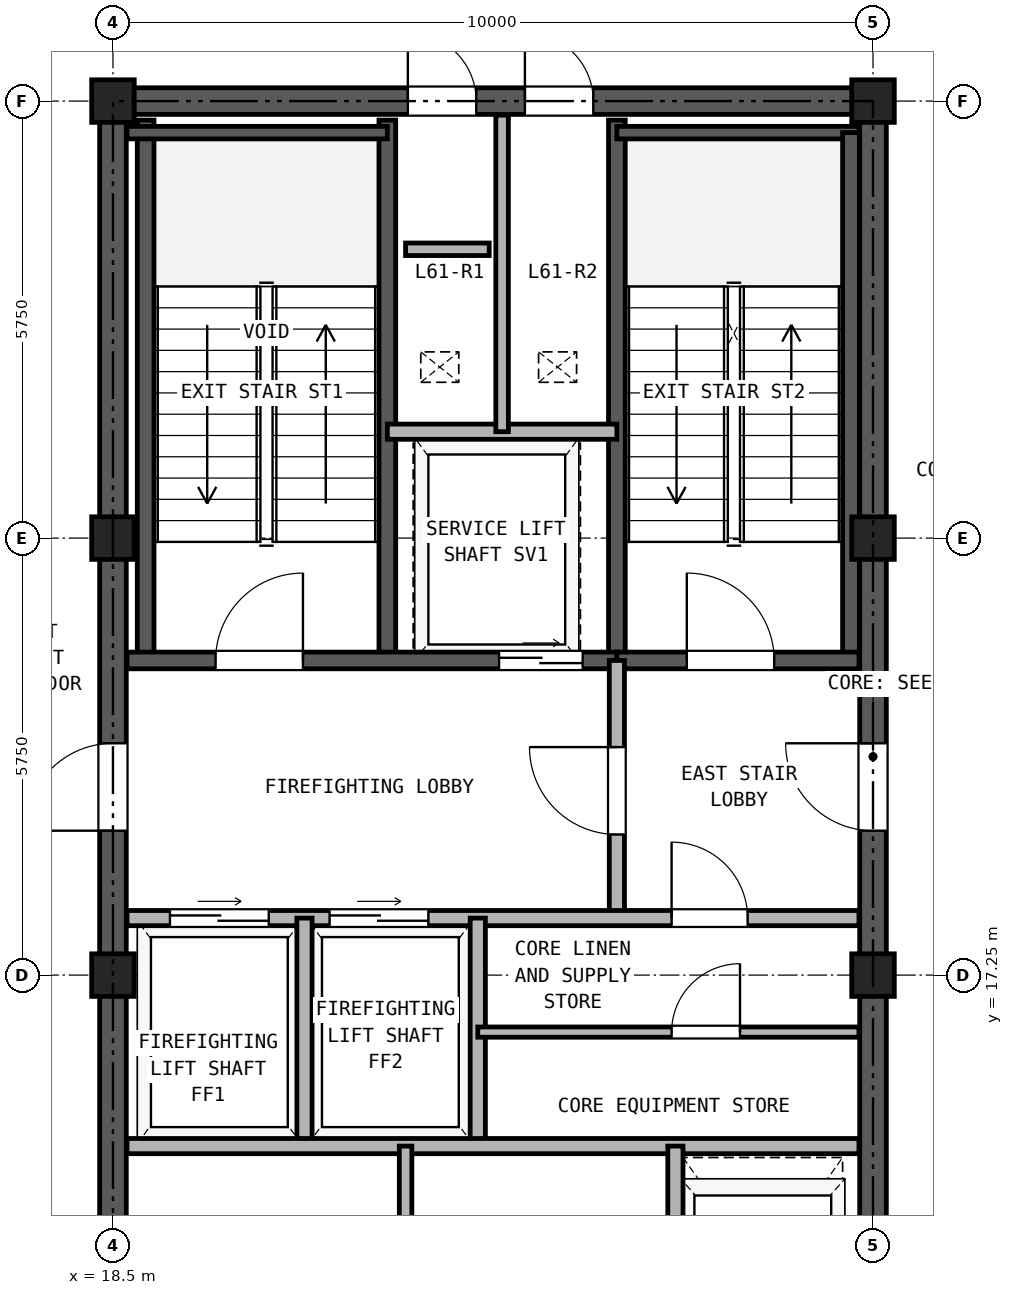
"""IFC4 building model, lengths in metres.
Left out: names, types, materials, properties, quantities, classifications, styles, units other than length and angle.
Written with IfcOpenShell. Run it as: python <this file> out.ifc"""

import sys

from ifc_helpers import new_model, si_unit, direction, frame, frame_2d, origin, origin_2d, place, context, subcontext, project, spatial, rectangle, hollow_rectangle, extrude, source, transform, mapped, element, fill, save


model = new_model("IFC4")
c1 = context("Model", 3, precision=1e-05, world=origin(), true_north=direction((0.0, 1.0)))
c2 = subcontext(c1, "Body", "Model", "MODEL_VIEW")
j1 = project(units=[si_unit("LENGTHUNIT", "METRE"), si_unit("PLANEANGLEUNIT", "RADIAN")], contexts=[c1])
p1 = place(None, origin())
s1 = spatial("IfcSite", under=j1, at=p1, CompositionType="ELEMENT")
p2 = place(p1, origin())
s2 = spatial("IfcBuilding", under=s1, at=p2, CompositionType="ELEMENT")
p3 = place(p2, frame((0.0, 0.0, 215.6)))
s3 = spatial("IfcBuildingStorey", under=s2, at=p3, CompositionType="ELEMENT", Elevation=215.6)
m1 = source(origin(), c2, "Body", "SweptSolid", [
    extrude(hollow_rectangle(XDim=0.56, YDim=0.56, WallThickness=0.03, at=origin_2d()), origin(), (0.0, 0.0, 1.0), 4.28),
])
for number, where, z_axis, x_axis in (
    (1, (18.5, 17.25, 0.0), (0.0, 0.0, 1.0), (1.0, 0.0, 0.0)),
    (2, (18.5, 23.0, 0.0), (0.0, 0.0, 1.0), (1.0, 0.0, 0.0)),
    (3, (18.5, 28.75, 0.0), (0.0, 0.0, 1.0), (1.0, 0.0, 0.0)),
    (4, (28.5, 17.25, 0.0), (0.0, 0.0, 1.0), (1.0, 0.0, 0.0)),
    (5, (28.5, 23.0, 0.0), (0.0, 0.0, 1.0), (1.0, 0.0, 0.0)),
    (6, (28.5, 28.75, 0.0), (0.0, 0.0, 1.0), (1.0, 0.0, 0.0)),
):
    element("IfcColumn", number, at=place(p3, frame(where, z_axis=z_axis, x_axis=x_axis)), inside=s3, PredefinedType="COLUMN", context=c2, shape_type="MappedRepresentation", body=[
        mapped(m1, transform((0.0, 0.0, 0.0), x_axis=(1.0, 0.0, 0.0), y_axis=(0.0, 1.0, 0.0), z_axis=(0.0, 0.0, 1.0), scale=1.0)),
    ])
p4 = place(p3, frame((18.325, 28.75, 0.0), z_axis=(0.0, 0.0, 1.0), x_axis=(1.0, 0.0, 0.0)))
e7 = element("IfcWall", 7, at=p4, inside=s3, PredefinedType="SHEAR", context=c2, shape_type="SweptSolid", body=[
    extrude(rectangle(XDim=10.35, YDim=0.35, at=frame_2d((5.175, 0.0))), origin(), (0.0, 0.0, 1.0), 4.28),
])
p5 = place(p4, frame((4.055, 0.0, 0.0)))
e8 = element("IfcOpeningElement", 8, at=p5, cuts=e7, PredefinedType="OPENING", context=c2, shape_type="SweptSolid", body=[
    extrude(rectangle(XDim=0.9, YDim=2.05, at=frame_2d((0.45, 1.025))), frame((0.0, 0.185, 0.0), z_axis=(0.0, -1.0, 0.0), x_axis=(1.0, 0.0, 0.0)), (0.0, 0.0, 1.0), 0.37),
])
p6 = place(p4, frame((5.595, 0.0, 0.0)))
e9 = element("IfcOpeningElement", 9, at=p6, cuts=e7, PredefinedType="OPENING", context=c2, shape_type="SweptSolid", body=[
    extrude(rectangle(XDim=0.9, YDim=2.05, at=frame_2d((0.45, 1.025))), frame((0.0, 0.185, 0.0), z_axis=(0.0, -1.0, 0.0), x_axis=(1.0, 0.0, 0.0)), (0.0, 0.0, 1.0), 0.37),
])
p7 = place(p3, frame((18.5, 11.675, 0.0), z_axis=(0.0, 0.0, 1.0), x_axis=(0.0, 1.0, 0.0)))
e10 = element("IfcWall", 10, at=p7, inside=s3, PredefinedType="SHEAR", context=c2, shape_type="SweptSolid", body=[
    extrude(rectangle(XDim=16.9, YDim=0.35, at=frame_2d((8.45, 0.0))), origin(), (0.0, 0.0, 1.0), 4.28),
])
p8 = place(p7, frame((7.475, 0.0, 0.0)))
e11 = element("IfcOpeningElement", 11, at=p8, cuts=e10, PredefinedType="OPENING", context=c2, shape_type="SweptSolid", body=[
    extrude(rectangle(XDim=1.15, YDim=2.2, at=frame_2d((0.575, 1.1))), frame((0.0, 0.185, 0.0), z_axis=(0.0, -1.0, 0.0), x_axis=(1.0, 0.0, 0.0)), (0.0, 0.0, 1.0), 0.37),
])
p9 = place(p3, frame((28.5, 11.675, 0.0), z_axis=(0.0, 0.0, 1.0), x_axis=(0.0, 1.0, 0.0)))
e12 = element("IfcWall", 12, at=p9, inside=s3, PredefinedType="SHEAR", context=c2, shape_type="SweptSolid", body=[
    extrude(rectangle(XDim=16.9, YDim=0.35, at=frame_2d((8.45, 0.0))), origin(), (0.0, 0.0, 1.0), 4.28),
])
p10 = place(p9, frame((7.475, 0.0, 0.0)))
e13 = element("IfcOpeningElement", 13, at=p10, cuts=e12, PredefinedType="OPENING", context=c2, shape_type="SweptSolid", body=[
    extrude(rectangle(XDim=1.15, YDim=2.2, at=frame_2d((0.575, 1.1))), frame((0.0, 0.185, 0.0), z_axis=(0.0, -1.0, 0.0), x_axis=(1.0, 0.0, 0.0)), (0.0, 0.0, 1.0), 0.37),
])
for number, where, z_axis, x_axis in (
    (14, (18.93, 21.39, 0.0), (0.0, 0.0, 1.0), (0.0, 1.0, 0.0)),
    (15, (22.11, 21.39, 0.0), (0.0, 0.0, 1.0), (0.0, 1.0, 0.0)),
    (16, (25.13, 21.39, 0.0), (0.0, 0.0, 1.0), (0.0, 1.0, 0.0)),
):
    element("IfcWall", number, at=place(p3, frame(where, z_axis=z_axis, x_axis=x_axis)), inside=s3, PredefinedType="SOLIDWALL", context=c2, shape_type="SweptSolid", body=[
        extrude(rectangle(XDim=7.11, YDim=0.22, at=frame_2d((3.555, 0.0))), origin(), (0.0, 0.0, 1.0), 4.28),
    ])
p11 = place(p3, frame((18.685, 28.335, 0.0), z_axis=(0.0, 0.0, 1.0), x_axis=(1.0, 0.0, 0.0)))
e17 = element("IfcWall", 17, at=p11, inside=s3, PredefinedType="PARTITIONING", context=c2, shape_type="SweptSolid", body=[
    extrude(rectangle(XDim=3.425, YDim=0.165, at=frame_2d((1.712, 0.0))), origin(), (0.0, 0.0, 1.0), 4.28),
])
p12 = place(p3, frame((25.13, 28.335, 0.0), z_axis=(0.0, 0.0, 1.0), x_axis=(1.0, 0.0, 0.0)))
e18 = element("IfcWall", 18, at=p12, inside=s3, PredefinedType="PARTITIONING", context=c2, shape_type="SweptSolid", body=[
    extrude(rectangle(XDim=3.185, YDim=0.165, at=frame_2d((1.593, 0.0))), origin(), (0.0, 0.0, 1.0), 4.28),
])
p13 = place(p3, frame((28.21, 21.39, 0.0), z_axis=(0.0, 0.0, 1.0), x_axis=(0.0, 1.0, 0.0)))
e19 = element("IfcWall", 19, at=p13, inside=s3, PredefinedType="SOLIDWALL", context=c2, shape_type="SweptSolid", body=[
    extrude(rectangle(XDim=6.945, YDim=0.22, at=frame_2d((3.473, 0.0))), origin(), (0.0, 0.0, 1.0), 4.28),
])
p14 = place(p3, frame((18.685, 21.39, 0.0), z_axis=(0.0, 0.0, 1.0), x_axis=(1.0, 0.0, 0.0)))
e20 = element("IfcWall", 20, at=p14, inside=s3, PredefinedType="SOLIDWALL", context=c2, shape_type="SweptSolid", body=[
    extrude(rectangle(XDim=6.445, YDim=0.22, at=frame_2d((3.222, 0.0))), origin(), (0.0, 0.0, 1.0), 4.28),
])
p15 = place(p14, frame((1.165, 0.0, 0.0)))
e21 = element("IfcOpeningElement", 21, at=p15, cuts=e20, PredefinedType="OPENING", context=c2, shape_type="SweptSolid", body=[
    extrude(rectangle(XDim=1.15, YDim=2.2, at=frame_2d((0.575, 1.1))), frame((0.0, 0.12, 0.0), z_axis=(0.0, -1.0, 0.0), x_axis=(1.0, 0.0, 0.0)), (0.0, 0.0, 1.0), 0.24),
])
p16 = place(p14, frame((4.895, 0.0, 0.0)))
e22 = element("IfcOpeningElement", 22, at=p16, cuts=e20, PredefinedType="OPENING", context=c2, shape_type="SweptSolid", body=[
    extrude(rectangle(XDim=1.1, YDim=2.25, at=frame_2d((0.55, 1.125))), frame((0.0, 0.12, 0.0), z_axis=(0.0, -1.0, 0.0), x_axis=(1.0, 0.0, 0.0)), (0.0, 0.0, 1.0), 0.24),
])
p17 = place(p3, frame((25.13, 21.39, 0.0), z_axis=(0.0, 0.0, 1.0), x_axis=(1.0, 0.0, 0.0)))
e23 = element("IfcWall", 23, at=p17, inside=s3, PredefinedType="SOLIDWALL", context=c2, shape_type="SweptSolid", body=[
    extrude(rectangle(XDim=3.185, YDim=0.22, at=frame_2d((1.593, 0.0))), origin(), (0.0, 0.0, 1.0), 4.28),
])
p18 = place(p17, frame((0.92, 0.0, 0.0)))
e24 = element("IfcOpeningElement", 24, at=p18, cuts=e23, PredefinedType="OPENING", context=c2, shape_type="SweptSolid", body=[
    extrude(rectangle(XDim=1.15, YDim=2.2, at=frame_2d((0.575, 1.1))), frame((0.0, 0.12, 0.0), z_axis=(0.0, -1.0, 0.0), x_axis=(1.0, 0.0, 0.0)), (0.0, 0.0, 1.0), 0.24),
])
p19 = place(p3, frame((22.11, 24.4, 0.0), z_axis=(0.0, 0.0, 1.0), x_axis=(1.0, 0.0, 0.0)))
e25 = element("IfcWall", 25, at=p19, inside=s3, PredefinedType="PARTITIONING", context=c2, shape_type="SweptSolid", body=[
    extrude(rectangle(XDim=3.02, YDim=0.2, at=frame_2d((1.51, 0.0))), origin(), (0.0, 0.0, 1.0), 4.28),
])
p20 = place(p3, frame((23.62, 24.4, 0.0), z_axis=(0.0, 0.0, 1.0), x_axis=(0.0, 1.0, 0.0)))
e26 = element("IfcWall", 26, at=p20, inside=s3, PredefinedType="PARTITIONING", context=c2, shape_type="SweptSolid", body=[
    extrude(rectangle(XDim=4.165, YDim=0.165, at=frame_2d((2.083, 0.0))), origin(), (0.0, 0.0, 1.0), 4.28),
])
p21 = place(p3, frame((25.13, 18.0, 0.0), z_axis=(0.0, 0.0, 1.0), x_axis=(0.0, 1.0, 0.0)))
e27 = element("IfcWall", 27, at=p21, inside=s3, PredefinedType="PARTITIONING", context=c2, shape_type="SweptSolid", body=[
    extrude(rectangle(XDim=3.39, YDim=0.2, at=frame_2d((1.695, 0.0))), origin(), (0.0, 0.0, 1.0), 4.28),
])
p22 = place(p21, frame((1.1, 0.0, 0.0)))
e28 = element("IfcOpeningElement", 28, at=p22, cuts=e27, PredefinedType="OPENING", context=c2, shape_type="SweptSolid", body=[
    extrude(rectangle(XDim=1.15, YDim=2.2, at=frame_2d((0.575, 1.1))), frame((0.0, 0.11, 0.0), z_axis=(0.0, -1.0, 0.0), x_axis=(1.0, 0.0, 0.0)), (0.0, 0.0, 1.0), 0.22),
])
p23 = place(p3, frame((18.685, 18.0, 0.0), z_axis=(0.0, 0.0, 1.0), x_axis=(1.0, 0.0, 0.0)))
e29 = element("IfcWall", 29, at=p23, inside=s3, PredefinedType="PARTITIONING", context=c2, shape_type="SweptSolid", body=[
    extrude(rectangle(XDim=9.63, YDim=0.2, at=frame_2d((4.815, 0.0))), origin(), (0.0, 0.0, 1.0), 4.28),
])
p24 = place(p23, frame((0.565, 0.0, 0.0)))
e30 = element("IfcOpeningElement", 30, at=p24, cuts=e29, PredefinedType="OPENING", context=c2, shape_type="SweptSolid", body=[
    extrude(rectangle(XDim=1.3, YDim=2.3, at=frame_2d((0.65, 1.15))), frame((0.0, 0.11, 0.0), z_axis=(0.0, -1.0, 0.0), x_axis=(1.0, 0.0, 0.0)), (0.0, 0.0, 1.0), 0.22),
])
p25 = place(p23, frame((2.665, 0.0, 0.0)))
e31 = element("IfcOpeningElement", 31, at=p25, cuts=e29, PredefinedType="OPENING", context=c2, shape_type="SweptSolid", body=[
    extrude(rectangle(XDim=1.3, YDim=2.3, at=frame_2d((0.65, 1.15))), frame((0.0, 0.11, 0.0), z_axis=(0.0, -1.0, 0.0), x_axis=(1.0, 0.0, 0.0)), (0.0, 0.0, 1.0), 0.22),
])
p26 = place(p23, frame((7.165, 0.0, 0.0)))
e32 = element("IfcOpeningElement", 32, at=p26, cuts=e29, PredefinedType="OPENING", context=c2, shape_type="SweptSolid", body=[
    extrude(rectangle(XDim=1.0, YDim=2.15, at=frame_2d((0.5, 1.075))), frame((0.0, 0.11, 0.0), z_axis=(0.0, -1.0, 0.0), x_axis=(1.0, 0.0, 0.0)), (0.0, 0.0, 1.0), 0.22),
])
for number, where, z_axis, x_axis in (
    (33, (21.02, 15.0, 0.0), (0.0, 0.0, 1.0), (0.0, 1.0, 0.0)),
    (34, (23.3, 15.0, 0.0), (0.0, 0.0, 1.0), (0.0, 1.0, 0.0)),
):
    element("IfcWall", number, at=place(p3, frame(where, z_axis=z_axis, x_axis=x_axis)), inside=s3, PredefinedType="PARTITIONING", context=c2, shape_type="SweptSolid", body=[
        extrude(rectangle(XDim=3.0, YDim=0.2, at=frame_2d((1.5, 0.0))), origin(), (0.0, 0.0, 1.0), 4.28),
    ])
p27 = place(p3, frame((18.685, 15.0, 0.0), z_axis=(0.0, 0.0, 1.0), x_axis=(1.0, 0.0, 0.0)))
e35 = element("IfcWall", 35, at=p27, inside=s3, PredefinedType="PARTITIONING", context=c2, shape_type="SweptSolid", body=[
    extrude(rectangle(XDim=9.63, YDim=0.2, at=frame_2d((4.815, 0.0))), origin(), (0.0, 0.0, 1.0), 4.28),
])
p28 = place(p3, frame((23.3, 16.5, 0.0), z_axis=(0.0, 0.0, 1.0), x_axis=(1.0, 0.0, 0.0)))
e36 = element("IfcWall", 36, at=p28, inside=s3, PredefinedType="PARTITIONING", context=c2, shape_type="SweptSolid", body=[
    extrude(rectangle(XDim=5.015, YDim=0.135, at=frame_2d((2.507, 0.0))), origin(), (0.0, 0.0, 1.0), 4.28),
])
p29 = place(p28, frame((2.55, 0.0, 0.0)))
e37 = element("IfcOpeningElement", 37, at=p29, cuts=e36, PredefinedType="OPENING", context=c2, shape_type="SweptSolid", body=[
    extrude(rectangle(XDim=0.9, YDim=2.05, at=frame_2d((0.45, 1.025))), frame((0.0, 0.077, 0.0), z_axis=(0.0, -1.0, 0.0), x_axis=(1.0, 0.0, 0.0)), (0.0, 0.0, 1.0), 0.155),
])
p30 = place(p3, frame((22.35, 11.685, 0.0), z_axis=(0.0, 0.0, 1.0), x_axis=(0.0, 1.0, 0.0)))
e38 = element("IfcWall", 38, at=p30, inside=s3, PredefinedType="PARTITIONING", context=c2, shape_type="SweptSolid", body=[
    extrude(rectangle(XDim=3.315, YDim=0.165, at=frame_2d((1.657, 0.0))), origin(), (0.0, 0.0, 1.0), 4.28),
])
p31 = place(p3, frame((25.9, 11.685, 0.0), z_axis=(0.0, 0.0, 1.0), x_axis=(0.0, 1.0, 0.0)))
e39 = element("IfcWall", 39, at=p31, inside=s3, PredefinedType="PARTITIONING", context=c2, shape_type="SweptSolid", body=[
    extrude(rectangle(XDim=3.315, YDim=0.2, at=frame_2d((1.657, 0.0))), origin(), (0.0, 0.0, 1.0), 4.28),
])
p32 = place(p3, frame((22.35, 26.8, 0.0), z_axis=(0.0, 0.0, 1.0), x_axis=(1.0, 0.0, 0.0)))
e40 = element("IfcWall", 40, at=p32, inside=s3, PredefinedType="PARTITIONING", context=c2, shape_type="SweptSolid", body=[
    extrude(rectangle(XDim=1.1, YDim=0.165, at=frame_2d((0.55, 0.0))), origin(), (0.0, 0.0, 1.0), 4.28),
])
p33 = place(p15, frame((1.15, 0.0, 0.0), z_axis=(0.0, 0.0, 1.0), x_axis=(-1.0, 0.0, 0.0)))
e41 = element("IfcDoor", 41, at=p33, inside=s3, OperationType="SINGLE_SWING_RIGHT", PredefinedType="DOOR", context=c2, shape_type="SweptSolid", body=[
    extrude(rectangle(XDim=1.15, YDim=2.2, at=frame_2d((0.575, 1.1))), frame((0.0, 0.025, 0.0), z_axis=(0.0, -1.0, 0.0), x_axis=(1.0, 0.0, 0.0)), (0.0, 0.0, 1.0), 0.05),
])
fill(e21, e41)
p34 = place(p18, frame((1.15, 0.0, 0.0), z_axis=(0.0, 0.0, 1.0), x_axis=(-1.0, 0.0, 0.0)))
e42 = element("IfcDoor", 42, at=p34, inside=s3, OperationType="SINGLE_SWING_LEFT", PredefinedType="DOOR", context=c2, shape_type="SweptSolid", body=[
    extrude(rectangle(XDim=1.15, YDim=2.2, at=frame_2d((0.575, 1.1))), frame((0.0, 0.025, 0.0), z_axis=(0.0, -1.0, 0.0), x_axis=(1.0, 0.0, 0.0)), (0.0, 0.0, 1.0), 0.05),
])
fill(e24, e42)
p35 = place(p16, frame((1.1, 0.0, 0.0), z_axis=(0.0, 0.0, 1.0), x_axis=(-1.0, 0.0, 0.0)))
e43 = element("IfcDoor", 43, at=p35, inside=s3, OperationType="DOUBLE_DOOR_SLIDING", PredefinedType="DOOR", context=c2, shape_type="SweptSolid", body=[
    extrude(rectangle(XDim=1.1, YDim=2.25, at=frame_2d((0.55, 1.125))), frame((0.0, 0.025, 0.0), z_axis=(0.0, -1.0, 0.0), x_axis=(1.0, 0.0, 0.0)), (0.0, 0.0, 1.0), 0.05),
])
fill(e22, e43)
p36 = place(p22, origin())
e44 = element("IfcDoor", 44, at=p36, inside=s3, OperationType="SINGLE_SWING_RIGHT", PredefinedType="DOOR", context=c2, shape_type="SweptSolid", body=[
    extrude(rectangle(XDim=1.15, YDim=2.2, at=frame_2d((0.575, 1.1))), frame((0.0, 0.025, 0.0), z_axis=(0.0, -1.0, 0.0), x_axis=(1.0, 0.0, 0.0)), (0.0, 0.0, 1.0), 0.05),
])
fill(e28, e44)
p37 = place(p24, origin())
e45 = element("IfcDoor", 45, at=p37, inside=s3, OperationType="DOUBLE_DOOR_SLIDING", PredefinedType="DOOR", context=c2, shape_type="SweptSolid", body=[
    extrude(rectangle(XDim=1.3, YDim=2.3, at=frame_2d((0.65, 1.15))), frame((0.0, 0.025, 0.0), z_axis=(0.0, -1.0, 0.0), x_axis=(1.0, 0.0, 0.0)), (0.0, 0.0, 1.0), 0.05),
])
fill(e30, e45)
p38 = place(p25, origin())
e46 = element("IfcDoor", 46, at=p38, inside=s3, OperationType="DOUBLE_DOOR_SLIDING", PredefinedType="DOOR", context=c2, shape_type="SweptSolid", body=[
    extrude(rectangle(XDim=1.3, YDim=2.3, at=frame_2d((0.65, 1.15))), frame((0.0, 0.025, 0.0), z_axis=(0.0, -1.0, 0.0), x_axis=(1.0, 0.0, 0.0)), (0.0, 0.0, 1.0), 0.05),
])
fill(e31, e46)
p39 = place(p26, frame((1.0, 0.0, 0.0), z_axis=(0.0, 0.0, 1.0), x_axis=(-1.0, 0.0, 0.0)))
e47 = element("IfcDoor", 47, at=p39, inside=s3, OperationType="SINGLE_SWING_LEFT", PredefinedType="DOOR", context=c2, shape_type="SweptSolid", body=[
    extrude(rectangle(XDim=1.0, YDim=2.15, at=frame_2d((0.5, 1.075))), frame((0.0, 0.025, 0.0), z_axis=(0.0, -1.0, 0.0), x_axis=(1.0, 0.0, 0.0)), (0.0, 0.0, 1.0), 0.05),
])
fill(e32, e47)
p40 = place(p29, frame((0.9, 0.0, 0.0), z_axis=(0.0, 0.0, 1.0), x_axis=(-1.0, 0.0, 0.0)))
e48 = element("IfcDoor", 48, at=p40, inside=s3, OperationType="SINGLE_SWING_RIGHT", PredefinedType="DOOR", context=c2, shape_type="SweptSolid", body=[
    extrude(rectangle(XDim=0.9, YDim=2.05, at=frame_2d((0.45, 1.025))), frame((0.0, 0.025, 0.0), z_axis=(0.0, -1.0, 0.0), x_axis=(1.0, 0.0, 0.0)), (0.0, 0.0, 1.0), 0.05),
])
fill(e37, e48)
p41 = place(p8, frame((1.15, 0.0, 0.0), z_axis=(0.0, 0.0, 1.0), x_axis=(-1.0, 0.0, 0.0)))
e49 = element("IfcDoor", 49, at=p41, inside=s3, OperationType="SINGLE_SWING_LEFT", PredefinedType="DOOR", context=c2, shape_type="SweptSolid", body=[
    extrude(rectangle(XDim=1.15, YDim=2.2, at=frame_2d((0.575, 1.1))), frame((0.0, 0.025, 0.0), z_axis=(0.0, -1.0, 0.0), x_axis=(1.0, 0.0, 0.0)), (0.0, 0.0, 1.0), 0.05),
])
fill(e11, e49)
p42 = place(p10, origin())
e50 = element("IfcDoor", 50, at=p42, inside=s3, OperationType="SINGLE_SWING_RIGHT", PredefinedType="DOOR", context=c2, shape_type="SweptSolid", body=[
    extrude(rectangle(XDim=1.15, YDim=2.2, at=frame_2d((0.575, 1.1))), frame((0.0, 0.025, 0.0), z_axis=(0.0, -1.0, 0.0), x_axis=(1.0, 0.0, 0.0)), (0.0, 0.0, 1.0), 0.05),
])
fill(e13, e50)
p43 = place(p5, origin())
e51 = element("IfcDoor", 51, at=p43, inside=s3, OperationType="SINGLE_SWING_LEFT", PredefinedType="DOOR", context=c2, shape_type="SweptSolid", body=[
    extrude(rectangle(XDim=0.9, YDim=2.05, at=frame_2d((0.45, 1.025))), frame((0.0, 0.025, 0.0), z_axis=(0.0, -1.0, 0.0), x_axis=(1.0, 0.0, 0.0)), (0.0, 0.0, 1.0), 0.05),
])
fill(e8, e51)
p44 = place(p6, origin())
e52 = element("IfcDoor", 52, at=p44, inside=s3, OperationType="SINGLE_SWING_LEFT", PredefinedType="DOOR", context=c2, shape_type="SweptSolid", body=[
    extrude(rectangle(XDim=0.9, YDim=2.05, at=frame_2d((0.45, 1.025))), frame((0.0, 0.025, 0.0), z_axis=(0.0, -1.0, 0.0), x_axis=(1.0, 0.0, 0.0)), (0.0, 0.0, 1.0), 0.05),
])
fill(e9, e52)
save(model, sys.argv[1])
